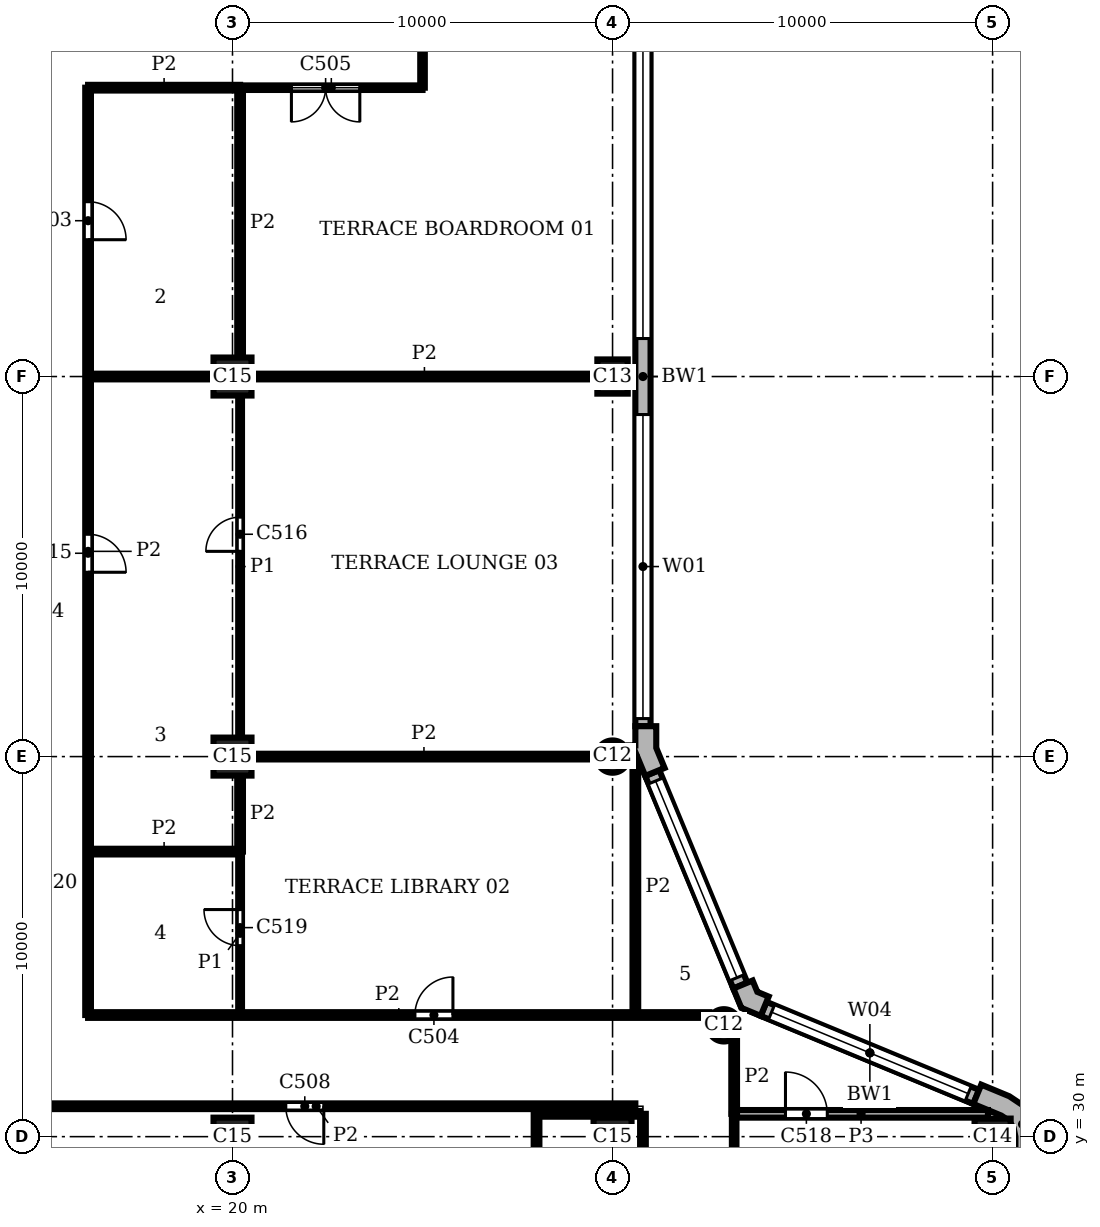
"""IFC4 building model, lengths in metres.
Left out: names, types, materials, properties, quantities, classifications, styles, units other than length and angle.
Written with IfcOpenShell. Run it as: python <this file> out.ifc"""

import sys

from ifc_helpers import new_model, si_unit, direction, frame, frame_2d, origin, origin_2d, place, context, subcontext, project, spatial, polyline, rectangle, circle, outline, extrude, element, fill, save


model = new_model("IFC4")
c1 = context("Model", 3, precision=1e-05, world=origin(), true_north=direction((0.0, 1.0)))
c2 = subcontext(c1, "Body", "Model", "MODEL_VIEW")
j1 = project(units=[si_unit("LENGTHUNIT", "METRE"), si_unit("PLANEANGLEUNIT", "RADIAN")], contexts=[c1])
p1 = place(None, origin())
s1 = spatial("IfcSite", under=j1, at=p1, CompositionType="ELEMENT")
p2 = place(p1, origin())
s2 = spatial("IfcBuilding", under=s1, at=p2, CompositionType="ELEMENT")
p3 = place(p2, frame((0.0, 0.0, 290.4)))
s3 = spatial("IfcBuildingStorey", under=s2, at=p3, CompositionType="ELEMENT", Elevation=290.4)
p4 = place(p3, frame((40.0, 30.0, 0.0), z_axis=(0.0, 0.0, 1.0), x_axis=(1.0, 0.0, 0.0)))
e1 = element("IfcColumn", 1, at=p4, inside=s3, PredefinedType="COLUMN", context=c2, shape_type="SweptSolid", body=[
    extrude(rectangle(XDim=0.95, YDim=0.95, at=origin_2d()), origin(), (0.0, 0.0, 1.0), 3.9),
])
for number, where, z_axis, x_axis in (
    (2, (32.929, 32.929, 0.0), (0.0, 0.0, 1.0), (1.0, 0.0, 0.0)),
    (3, (30.0, 40.0, 0.0), (0.0, 0.0, 1.0), (1.0, 0.0, 0.0)),
):
    element("IfcColumn", number, at=place(p3, frame(where, z_axis=z_axis, x_axis=x_axis)), inside=s3, PredefinedType="COLUMN", context=c2, shape_type="SweptSolid", body=[
        extrude(circle(Radius=0.425, at=origin_2d()), origin(), (0.0, 0.0, 1.0), 3.9),
    ])
p5 = place(p3, frame((30.0, 50.0, 0.0), z_axis=(0.0, 0.0, 1.0), x_axis=(0.0, 1.0, 0.0)))
e4 = element("IfcColumn", 4, at=p5, inside=s3, PredefinedType="COLUMN", context=c2, shape_type="SweptSolid", body=[
    extrude(rectangle(XDim=0.9, YDim=0.8, at=origin_2d()), origin(), (0.0, 0.0, 1.0), 3.9),
])
for number, where, z_axis, x_axis in (
    (5, (20.0, 30.0, 0.0), (0.0, 0.0, 1.0), (1.0, 0.0, 0.0)),
    (6, (20.0, 40.0, 0.0), (0.0, 0.0, 1.0), (1.0, 0.0, 0.0)),
    (7, (20.0, 50.0, 0.0), (0.0, 0.0, 1.0), (1.0, 0.0, 0.0)),
    (8, (30.0, 30.0, 0.0), (0.0, 0.0, 1.0), (1.0, 0.0, 0.0)),
):
    element("IfcColumn", number, at=place(p3, frame(where, z_axis=z_axis, x_axis=x_axis)), inside=s3, PredefinedType="COLUMN", context=c2, shape_type="SweptSolid", body=[
        extrude(rectangle(XDim=1.0, YDim=1.0, at=origin_2d()), origin(), (0.0, 0.0, 1.0), 3.9),
    ])
p6 = place(p3, origin())
e9 = element("IfcWall", 9, at=p6, inside=s3, PredefinedType="SOLIDWALL", context=c2, shape_type="SweptSolid", body=[
    extrude(outline(polyline([(41.0, 29.2), (41.15, 29.2), (41.15, 30.0), (41.062, 30.44), (40.813, 30.813), (40.44, 31.062), (39.701, 31.369), (39.644, 31.23), (39.49, 30.861), (40.229, 30.554), (40.424, 30.424), (40.554, 30.229), (40.6, 30.0), (40.6, 29.2), (41.0, 29.2)])), origin(), (0.0, 0.0, 1.0), 3.9),
])
e10 = element("IfcWall", 10, at=p6, inside=s3, PredefinedType="SOLIDWALL", context=c2, shape_type="SweptSolid", body=[
    extrude(outline(polyline([(34.051, 33.547), (34.108, 33.685), (33.809, 33.809), (33.685, 34.108), (33.547, 34.051), (33.177, 33.898), (33.388, 33.388), (33.898, 33.177), (34.051, 33.547)])), origin(), (0.0, 0.0, 1.0), 3.9),
])
e11 = element("IfcWall", 11, at=p6, inside=s3, PredefinedType="SOLIDWALL", context=c2, shape_type="SweptSolid", body=[
    extrude(outline(polyline([(30.62, 39.995), (30.62, 40.071), (30.861, 39.49), (31.23, 39.644), (31.369, 39.701), (31.15, 40.229), (31.15, 40.8), (31.0, 40.8), (30.6, 40.8), (30.6, 40.295), (30.425, 40.295), (30.425, 39.995), (30.62, 39.995)])), origin(), (0.0, 0.0, 1.0), 3.9),
])
p7 = place(p3, frame((39.567, 31.045, 0.0), z_axis=(0.0, 0.0, 1.0), x_axis=(-0.923891000409, 0.382655745237, 0.0)))
e12 = element("IfcWall", 12, at=p7, inside=s3, PredefinedType="SOLIDWALL", context=c2, shape_type="SweptSolid", body=[
    extrude(rectangle(XDim=6.053, YDim=0.4, at=frame_2d((3.027, 0.0))), origin(), (0.0, 0.0, 1.0), 3.9),
])
p8 = place(p7, frame((0.227, 0.0, 0.9)))
e13 = element("IfcOpeningElement", 13, at=p8, cuts=e12, PredefinedType="OPENING", context=c2, shape_type="SweptSolid", body=[
    extrude(rectangle(XDim=5.6, YDim=2.35, at=frame_2d((2.8, 1.175))), frame((0.0, 0.21, 0.0), z_axis=(0.0, -1.0, 0.0), x_axis=(1.0, 0.0, 0.0)), (0.0, 0.0, 1.0), 0.42),
])
p9 = place(p3, frame((33.362, 33.974, 0.0), z_axis=(0.0, 0.0, 1.0), x_axis=(-0.382655745237, 0.923891000409, 0.0)))
e14 = element("IfcWall", 14, at=p9, inside=s3, PredefinedType="SOLIDWALL", context=c2, shape_type="SweptSolid", body=[
    extrude(rectangle(XDim=6.053, YDim=0.4, at=frame_2d((3.027, 0.0))), origin(), (0.0, 0.0, 1.0), 3.9),
])
p10 = place(p9, frame((0.227, 0.0, 0.9)))
e15 = element("IfcOpeningElement", 15, at=p10, cuts=e14, PredefinedType="OPENING", context=c2, shape_type="SweptSolid", body=[
    extrude(rectangle(XDim=5.6, YDim=2.35, at=frame_2d((2.8, 1.175))), frame((0.0, 0.21, 0.0), z_axis=(0.0, -1.0, 0.0), x_axis=(1.0, 0.0, 0.0)), (0.0, 0.0, 1.0), 0.42),
])
p11 = place(p3, frame((30.8, 40.8, 0.0), z_axis=(0.0, 0.0, 1.0), x_axis=(0.0, 1.0, 0.0)))
e16 = element("IfcWall", 16, at=p11, inside=s3, PredefinedType="SOLIDWALL", context=c2, shape_type="SweptSolid", body=[
    extrude(rectangle(XDim=18.4, YDim=0.4, at=frame_2d((9.2, 0.0))), origin(), (0.0, 0.0, 1.0), 3.9),
])
p12 = place(p11, frame((0.2, 0.0, 0.9)))
e17 = element("IfcOpeningElement", 17, at=p12, cuts=e16, PredefinedType="OPENING", context=c2, shape_type="SweptSolid", body=[
    extrude(rectangle(XDim=8.0, YDim=2.35, at=frame_2d((4.0, 1.175))), frame((0.0, 0.21, 0.0), z_axis=(0.0, -1.0, 0.0), x_axis=(1.0, 0.0, 0.0)), (0.0, 0.0, 1.0), 0.42),
])
p13 = place(p11, frame((10.2, 0.0, 0.9)))
e18 = element("IfcOpeningElement", 18, at=p13, cuts=e16, PredefinedType="OPENING", context=c2, shape_type="SweptSolid", body=[
    extrude(rectangle(XDim=8.0, YDim=2.35, at=frame_2d((4.0, 1.175))), frame((0.0, 0.21, 0.0), z_axis=(0.0, -1.0, 0.0), x_axis=(1.0, 0.0, 0.0)), (0.0, 0.0, 1.0), 0.42),
])
p14 = place(p3, frame((20.2, 33.2, 0.0), z_axis=(0.0, 0.0, 1.0), x_axis=(0.0, 1.0, 0.0)))
e19 = element("IfcWall", 19, at=p14, inside=s3, PredefinedType="PARTITIONING", context=c2, shape_type="SweptSolid", body=[
    extrude(rectangle(XDim=4.3, YDim=0.1, at=frame_2d((2.15, 0.0))), origin(), (0.0, 0.0, 1.0), 3.58),
])
p15 = place(p14, frame((1.825, 0.0, 0.0)))
e20 = element("IfcOpeningElement", 20, at=p15, cuts=e19, PredefinedType="OPENING", context=c2, shape_type="SweptSolid", body=[
    extrude(rectangle(XDim=0.95, YDim=2.1, at=frame_2d((0.475, 1.05))), frame((0.0, 0.06, 0.0), z_axis=(0.0, -1.0, 0.0), x_axis=(1.0, 0.0, 0.0)), (0.0, 0.0, 1.0), 0.12),
])
p16 = place(p3, frame((20.2, 40.5, 0.0), z_axis=(0.0, 0.0, 1.0), x_axis=(0.0, 1.0, 0.0)))
e21 = element("IfcWall", 21, at=p16, inside=s3, PredefinedType="PARTITIONING", context=c2, shape_type="SweptSolid", body=[
    extrude(rectangle(XDim=9.0, YDim=0.1, at=frame_2d((4.5, 0.0))), origin(), (0.0, 0.0, 1.0), 3.58),
])
p17 = place(p16, frame((4.9, 0.0, 0.0)))
e22 = element("IfcOpeningElement", 22, at=p17, cuts=e21, PredefinedType="OPENING", context=c2, shape_type="SweptSolid", body=[
    extrude(rectangle(XDim=0.9, YDim=2.1, at=frame_2d((0.45, 1.05))), frame((0.0, 0.06, 0.0), z_axis=(0.0, -1.0, 0.0), x_axis=(1.0, 0.0, 0.0)), (0.0, 0.0, 1.0), 0.12),
])
p18 = place(p3, frame((16.2, 33.2, 0.0), z_axis=(0.0, 0.0, 1.0), x_axis=(0.0, 1.0, 0.0)))
e23 = element("IfcWall", 23, at=p18, inside=s3, PredefinedType="PARTITIONING", context=c2, shape_type="SweptSolid", body=[
    extrude(rectangle(XDim=24.4, YDim=0.15, at=frame_2d((12.2, 0.0))), origin(), (0.0, 0.0, 1.0), 3.58),
])
p19 = place(p18, frame((20.4, 0.0, 0.0)))
e24 = element("IfcOpeningElement", 24, at=p19, cuts=e23, PredefinedType="OPENING", context=c2, shape_type="SweptSolid", body=[
    extrude(rectangle(XDim=1.0, YDim=2.1, at=frame_2d((0.5, 1.05))), frame((0.0, 0.085, 0.0), z_axis=(0.0, -1.0, 0.0), x_axis=(1.0, 0.0, 0.0)), (0.0, 0.0, 1.0), 0.17),
])
p20 = place(p18, frame((11.65, 0.0, 0.0)))
e25 = element("IfcOpeningElement", 25, at=p20, cuts=e23, PredefinedType="OPENING", context=c2, shape_type="SweptSolid", body=[
    extrude(rectangle(XDim=1.0, YDim=2.1, at=frame_2d((0.5, 1.05))), frame((0.0, 0.085, 0.0), z_axis=(0.0, -1.0, 0.0), x_axis=(1.0, 0.0, 0.0)), (0.0, 0.0, 1.0), 0.17),
])
p21 = place(p3, frame((20.2, 37.5, 0.0), z_axis=(0.0, 0.0, 1.0), x_axis=(0.0, 1.0, 0.0)))
e26 = element("IfcWall", 26, at=p21, inside=s3, PredefinedType="PARTITIONING", context=c2, shape_type="SweptSolid", body=[
    extrude(rectangle(XDim=2.0, YDim=0.15, at=frame_2d((1.0, 0.0))), origin(), (0.0, 0.0, 1.0), 3.58),
])
p22 = place(p3, frame((20.2, 50.5, 0.0), z_axis=(0.0, 0.0, 1.0), x_axis=(0.0, 1.0, 0.0)))
e27 = element("IfcWall", 27, at=p22, inside=s3, PredefinedType="PARTITIONING", context=c2, shape_type="SweptSolid", body=[
    extrude(rectangle(XDim=7.1, YDim=0.15, at=frame_2d((3.55, 0.0))), origin(), (0.0, 0.0, 1.0), 3.58),
])
p23 = place(p3, frame((28.0, 28.0, 0.0), z_axis=(0.0, 0.0, 1.0), x_axis=(0.0, 1.0, 0.0)))
e28 = element("IfcWall", 28, at=p23, inside=s3, PredefinedType="PARTITIONING", context=c2, shape_type="SweptSolid", body=[
    extrude(rectangle(XDim=2.598, YDim=0.15, at=frame_2d((1.299, 0.0))), origin(), (0.0, 0.0, 1.0), 3.58),
])
p24 = place(p3, frame((30.6, 33.2, 0.0), z_axis=(0.0, 0.0, 1.0), x_axis=(0.0, 1.0, 0.0)))
e29 = element("IfcWall", 29, at=p24, inside=s3, PredefinedType="PARTITIONING", context=c2, shape_type="SweptSolid", body=[
    extrude(rectangle(XDim=6.738, YDim=0.15, at=frame_2d((3.369, 0.0))), origin(), (0.0, 0.0, 1.0), 3.58),
])
p25 = place(p3, frame((30.8, 15.45, 0.0), z_axis=(0.0, 0.0, 1.0), x_axis=(0.0, 1.0, 0.0)))
e30 = element("IfcWall", 30, at=p25, inside=s3, PredefinedType="PARTITIONING", context=c2, shape_type="SweptSolid", body=[
    extrude(rectangle(XDim=15.15, YDim=0.15, at=frame_2d((7.575, 0.0))), origin(), (0.0, 0.0, 1.0), 3.58),
])
p26 = place(p25, frame((8.6, 0.0, 0.0)))
e31 = element("IfcOpeningElement", 31, at=p26, cuts=e30, PredefinedType="OPENING", context=c2, shape_type="SweptSolid", body=[
    extrude(rectangle(XDim=1.0, YDim=2.1, at=frame_2d((0.5, 1.05))), frame((0.0, 0.085, 0.0), z_axis=(0.0, -1.0, 0.0), x_axis=(1.0, 0.0, 0.0)), (0.0, 0.0, 1.0), 0.17),
])
p27 = place(p3, frame((33.2, 30.6, 0.0), z_axis=(0.0, 0.0, 1.0), x_axis=(0.0, 1.0, 0.0)))
e32 = element("IfcWall", 32, at=p27, inside=s3, PredefinedType="PARTITIONING", context=c2, shape_type="SweptSolid", body=[
    extrude(rectangle(XDim=1.952, YDim=0.15, at=frame_2d((0.976, 0.0))), origin(), (0.0, 0.0, 1.0), 3.58),
])
p28 = place(p3, frame((28.002, 30.6, 0.0), z_axis=(0.0, 0.0, 1.0), x_axis=(1.0, 0.0, 0.0)))
e33 = element("IfcWall", 33, at=p28, inside=s3, PredefinedType="PARTITIONING", context=c2, shape_type="SweptSolid", body=[
    extrude(rectangle(XDim=2.723, YDim=0.15, at=frame_2d((1.362, 0.0))), origin(), (0.0, 0.0, 1.0), 3.58),
])
p29 = place(p3, frame((13.802, 30.8, 0.0), z_axis=(0.0, 0.0, 1.0), x_axis=(1.0, 0.0, 0.0)))
e34 = element("IfcWall", 34, at=p29, inside=s3, PredefinedType="PARTITIONING", context=c2, shape_type="SweptSolid", body=[
    extrude(rectangle(XDim=16.798, YDim=0.15, at=frame_2d((8.399, 0.0))), origin(), (0.0, 0.0, 1.0), 3.58),
])
p30 = place(p29, frame((7.6, 0.0, 0.0)))
e35 = element("IfcOpeningElement", 35, at=p30, cuts=e34, PredefinedType="OPENING", context=c2, shape_type="SweptSolid", body=[
    extrude(rectangle(XDim=1.0, YDim=2.1, at=frame_2d((0.5, 1.05))), frame((0.0, 0.085, 0.0), z_axis=(0.0, -1.0, 0.0), x_axis=(1.0, 0.0, 0.0)), (0.0, 0.0, 1.0), 0.17),
])
p31 = place(p3, frame((16.2, 33.2, 0.0), z_axis=(0.0, 0.0, 1.0), x_axis=(1.0, 0.0, 0.0)))
e36 = element("IfcWall", 36, at=p31, inside=s3, PredefinedType="PARTITIONING", context=c2, shape_type="SweptSolid", body=[
    extrude(rectangle(XDim=16.352, YDim=0.15, at=frame_2d((8.176, 0.0))), origin(), (0.0, 0.0, 1.0), 3.58),
])
p32 = place(p31, frame((8.6, 0.0, 0.0)))
e37 = element("IfcOpeningElement", 37, at=p32, cuts=e36, PredefinedType="OPENING", context=c2, shape_type="SweptSolid", body=[
    extrude(rectangle(XDim=1.0, YDim=2.1, at=frame_2d((0.5, 1.05))), frame((0.0, 0.085, 0.0), z_axis=(0.0, -1.0, 0.0), x_axis=(1.0, 0.0, 0.0)), (0.0, 0.0, 1.0), 0.17),
])
p33 = place(p3, frame((16.2, 37.5, 0.0), z_axis=(0.0, 0.0, 1.0), x_axis=(1.0, 0.0, 0.0)))
e38 = element("IfcWall", 38, at=p33, inside=s3, PredefinedType="PARTITIONING", context=c2, shape_type="SweptSolid", body=[
    extrude(rectangle(XDim=4.0, YDim=0.15, at=frame_2d((2.0, 0.0))), origin(), (0.0, 0.0, 1.0), 3.58),
])
p34 = place(p3, frame((20.5, 40.0, 0.0), z_axis=(0.0, 0.0, 1.0), x_axis=(1.0, 0.0, 0.0)))
e39 = element("IfcWall", 39, at=p34, inside=s3, PredefinedType="PARTITIONING", context=c2, shape_type="SweptSolid", body=[
    extrude(rectangle(XDim=9.075, YDim=0.15, at=frame_2d((4.538, 0.0))), origin(), (0.0, 0.0, 1.0), 3.58),
])
p35 = place(p3, frame((16.2, 50.0, 0.0), z_axis=(0.0, 0.0, 1.0), x_axis=(1.0, 0.0, 0.0)))
e40 = element("IfcWall", 40, at=p35, inside=s3, PredefinedType="PARTITIONING", context=c2, shape_type="SweptSolid", body=[
    extrude(rectangle(XDim=3.3, YDim=0.15, at=frame_2d((1.65, 0.0))), origin(), (0.0, 0.0, 1.0), 3.58),
])
p36 = place(p3, frame((20.5, 50.0, 0.0), z_axis=(0.0, 0.0, 1.0), x_axis=(1.0, 0.0, 0.0)))
e41 = element("IfcWall", 41, at=p36, inside=s3, PredefinedType="PARTITIONING", context=c2, shape_type="SweptSolid", body=[
    extrude(rectangle(XDim=9.1, YDim=0.15, at=frame_2d((4.55, 0.0))), origin(), (0.0, 0.0, 1.0), 3.58),
])
p37 = place(p3, frame((16.2, 57.6, 0.0), z_axis=(0.0, 0.0, 1.0), x_axis=(1.0, 0.0, 0.0)))
e42 = element("IfcWall", 42, at=p37, inside=s3, PredefinedType="PARTITIONING", context=c2, shape_type="SweptSolid", body=[
    extrude(rectangle(XDim=4.0, YDim=0.15, at=frame_2d((2.0, 0.0))), origin(), (0.0, 0.0, 1.0), 3.58),
])
p38 = place(p3, frame((33.2, 30.6, 0.0), z_axis=(0.0, 0.0, 1.0), x_axis=(1.0, 0.0, 0.0)))
e43 = element("IfcWall", 43, at=p38, inside=s3, PredefinedType="PARTITIONING", context=c2, shape_type="SweptSolid", body=[
    extrude(rectangle(XDim=6.678, YDim=0.2, at=frame_2d((3.339, 0.0))), origin(), (0.0, 0.0, 1.0), 3.58),
])
p39 = place(p38, frame((1.35, 0.0, 0.0)))
e44 = element("IfcOpeningElement", 44, at=p39, cuts=e43, PredefinedType="OPENING", context=c2, shape_type="SweptSolid", body=[
    extrude(rectangle(XDim=1.1, YDim=2.1, at=frame_2d((0.55, 1.05))), frame((0.0, 0.11, 0.0), z_axis=(0.0, -1.0, 0.0), x_axis=(1.0, 0.0, 0.0)), (0.0, 0.0, 1.0), 0.22),
])
p40 = place(p3, frame((25.0, 57.6, 0.0), z_axis=(0.0, 0.0, 1.0), x_axis=(0.0, 1.0, 0.0)))
e45 = element("IfcWall", 45, at=p40, inside=s3, PredefinedType="PARTITIONING", context=c2, shape_type="SweptSolid", body=[
    extrude(rectangle(XDim=2.4, YDim=0.12, at=frame_2d((1.2, 0.0))), origin(), (0.0, 0.0, 1.0), 3.58),
])
p41 = place(p3, frame((33.2, 8.0, 0.0), z_axis=(0.0, 0.0, 1.0), x_axis=(0.0, 1.0, 0.0)))
e46 = element("IfcWall", 46, at=p41, inside=s3, PredefinedType="PARTITIONING", context=c2, shape_type="SweptSolid", body=[
    extrude(rectangle(XDim=22.6, YDim=0.12, at=frame_2d((11.3, 0.0))), origin(), (0.0, 0.0, 1.0), 3.58),
])
p42 = place(p41, frame((12.1, 0.0, 0.0)))
e47 = element("IfcOpeningElement", 47, at=p42, cuts=e46, PredefinedType="OPENING", context=c2, shape_type="SweptSolid", body=[
    extrude(rectangle(XDim=1.8, YDim=2.1, at=frame_2d((0.9, 1.05))), frame((0.0, 0.07, 0.0), z_axis=(0.0, -1.0, 0.0), x_axis=(1.0, 0.0, 0.0)), (0.0, 0.0, 1.0), 0.14),
])
p43 = place(p3, frame((20.2, 57.6, 0.0), z_axis=(0.0, 0.0, 1.0), x_axis=(1.0, 0.0, 0.0)))
e48 = element("IfcWall", 48, at=p43, inside=s3, PredefinedType="PARTITIONING", context=c2, shape_type="SweptSolid", body=[
    extrude(rectangle(XDim=4.8, YDim=0.12, at=frame_2d((2.4, 0.0))), origin(), (0.0, 0.0, 1.0), 3.58),
])
p44 = place(p43, frame((1.35, 0.0, 0.0)))
e49 = element("IfcOpeningElement", 49, at=p44, cuts=e48, PredefinedType="OPENING", context=c2, shape_type="SweptSolid", body=[
    extrude(rectangle(XDim=1.8, YDim=2.1, at=frame_2d((0.9, 1.05))), frame((0.0, 0.07, 0.0), z_axis=(0.0, -1.0, 0.0), x_axis=(1.0, 0.0, 0.0)), (0.0, 0.0, 1.0), 0.14),
])
p45 = place(p8, origin())
e50 = element("IfcWindow", 50, at=p45, inside=s3, PartitioningType="SINGLE_PANEL", PredefinedType="WINDOW", context=c2, shape_type="SweptSolid", body=[
    extrude(rectangle(XDim=5.6, YDim=2.35, at=frame_2d((2.8, 1.175))), frame((0.0, 0.16, 0.0), z_axis=(0.0, -1.0, 0.0), x_axis=(1.0, 0.0, 0.0)), (0.0, 0.0, 1.0), 0.06),
])
fill(e13, e50)
p46 = place(p10, origin())
e51 = element("IfcWindow", 51, at=p46, inside=s3, PartitioningType="SINGLE_PANEL", PredefinedType="WINDOW", context=c2, shape_type="SweptSolid", body=[
    extrude(rectangle(XDim=5.6, YDim=2.35, at=frame_2d((2.8, 1.175))), frame((0.0, 0.16, 0.0), z_axis=(0.0, -1.0, 0.0), x_axis=(1.0, 0.0, 0.0)), (0.0, 0.0, 1.0), 0.06),
])
fill(e15, e51)
p47 = place(p12, origin())
e52 = element("IfcWindow", 52, at=p47, inside=s3, PartitioningType="SINGLE_PANEL", PredefinedType="WINDOW", context=c2, shape_type="SweptSolid", body=[
    extrude(rectangle(XDim=8.0, YDim=2.35, at=frame_2d((4.0, 1.175))), frame((0.0, 0.16, 0.0), z_axis=(0.0, -1.0, 0.0), x_axis=(1.0, 0.0, 0.0)), (0.0, 0.0, 1.0), 0.06),
])
fill(e17, e52)
p48 = place(p13, origin())
e53 = element("IfcWindow", 53, at=p48, inside=s3, PartitioningType="SINGLE_PANEL", PredefinedType="WINDOW", context=c2, shape_type="SweptSolid", body=[
    extrude(rectangle(XDim=8.0, YDim=2.35, at=frame_2d((4.0, 1.175))), frame((0.0, 0.16, 0.0), z_axis=(0.0, -1.0, 0.0), x_axis=(1.0, 0.0, 0.0)), (0.0, 0.0, 1.0), 0.06),
])
fill(e18, e53)
p49 = place(p19, frame((1.0, 0.0, 0.0), z_axis=(0.0, 0.0, 1.0), x_axis=(-1.0, 0.0, 0.0)))
e54 = element("IfcDoor", 54, at=p49, inside=s3, OperationType="SINGLE_SWING_RIGHT", PredefinedType="DOOR", context=c2, shape_type="SweptSolid", body=[
    extrude(rectangle(XDim=1.0, YDim=2.1, at=frame_2d((0.5, 1.05))), frame((0.0, 0.025, 0.0), z_axis=(0.0, -1.0, 0.0), x_axis=(1.0, 0.0, 0.0)), (0.0, 0.0, 1.0), 0.05),
])
fill(e24, e54)
p50 = place(p32, origin())
e55 = element("IfcDoor", 55, at=p50, inside=s3, OperationType="SINGLE_SWING_RIGHT", PredefinedType="DOOR", context=c2, shape_type="SweptSolid", body=[
    extrude(rectangle(XDim=1.0, YDim=2.1, at=frame_2d((0.5, 1.05))), frame((0.0, 0.025, 0.0), z_axis=(0.0, -1.0, 0.0), x_axis=(1.0, 0.0, 0.0)), (0.0, 0.0, 1.0), 0.05),
])
fill(e37, e55)
p51 = place(p44, frame((1.8, 0.0, 0.0), z_axis=(0.0, 0.0, 1.0), x_axis=(-1.0, 0.0, 0.0)))
e56 = element("IfcDoor", 56, at=p51, inside=s3, OperationType="DOUBLE_DOOR_SINGLE_SWING", PredefinedType="DOOR", context=c2, shape_type="SweptSolid", body=[
    extrude(rectangle(XDim=1.8, YDim=2.1, at=frame_2d((0.9, 1.05))), frame((0.0, 0.025, 0.0), z_axis=(0.0, -1.0, 0.0), x_axis=(1.0, 0.0, 0.0)), (0.0, 0.0, 1.0), 0.05),
])
fill(e49, e56)
p52 = place(p30, frame((1.0, 0.0, 0.0), z_axis=(0.0, 0.0, 1.0), x_axis=(-1.0, 0.0, 0.0)))
e57 = element("IfcDoor", 57, at=p52, inside=s3, OperationType="SINGLE_SWING_LEFT", PredefinedType="DOOR", context=c2, shape_type="SweptSolid", body=[
    extrude(rectangle(XDim=1.0, YDim=2.1, at=frame_2d((0.5, 1.05))), frame((0.0, 0.025, 0.0), z_axis=(0.0, -1.0, 0.0), x_axis=(1.0, 0.0, 0.0)), (0.0, 0.0, 1.0), 0.05),
])
fill(e35, e57)
p53 = place(p20, frame((1.0, 0.0, 0.0), z_axis=(0.0, 0.0, 1.0), x_axis=(-1.0, 0.0, 0.0)))
e58 = element("IfcDoor", 58, at=p53, inside=s3, OperationType="SINGLE_SWING_RIGHT", PredefinedType="DOOR", context=c2, shape_type="SweptSolid", body=[
    extrude(rectangle(XDim=1.0, YDim=2.1, at=frame_2d((0.5, 1.05))), frame((0.0, 0.025, 0.0), z_axis=(0.0, -1.0, 0.0), x_axis=(1.0, 0.0, 0.0)), (0.0, 0.0, 1.0), 0.05),
])
fill(e25, e58)
p54 = place(p17, origin())
e59 = element("IfcDoor", 59, at=p54, inside=s3, OperationType="SINGLE_SWING_LEFT", PredefinedType="DOOR", context=c2, shape_type="SweptSolid", body=[
    extrude(rectangle(XDim=0.9, YDim=2.1, at=frame_2d((0.45, 1.05))), frame((0.0, 0.025, 0.0), z_axis=(0.0, -1.0, 0.0), x_axis=(1.0, 0.0, 0.0)), (0.0, 0.0, 1.0), 0.05),
])
fill(e22, e59)
p55 = place(p39, origin())
e60 = element("IfcDoor", 60, at=p55, inside=s3, OperationType="SINGLE_SWING_LEFT", PredefinedType="DOOR", context=c2, shape_type="SweptSolid", body=[
    extrude(rectangle(XDim=1.1, YDim=2.1, at=frame_2d((0.55, 1.05))), frame((0.0, 0.025, 0.0), z_axis=(0.0, -1.0, 0.0), x_axis=(1.0, 0.0, 0.0)), (0.0, 0.0, 1.0), 0.05),
])
fill(e44, e60)
p56 = place(p15, origin())
e61 = element("IfcDoor", 61, at=p56, inside=s3, OperationType="SINGLE_SWING_RIGHT", PredefinedType="DOOR", context=c2, shape_type="SweptSolid", body=[
    extrude(rectangle(XDim=0.95, YDim=2.1, at=frame_2d((0.475, 1.05))), frame((0.0, 0.025, 0.0), z_axis=(0.0, -1.0, 0.0), x_axis=(1.0, 0.0, 0.0)), (0.0, 0.0, 1.0), 0.05),
])
fill(e20, e61)
save(model, sys.argv[1])
